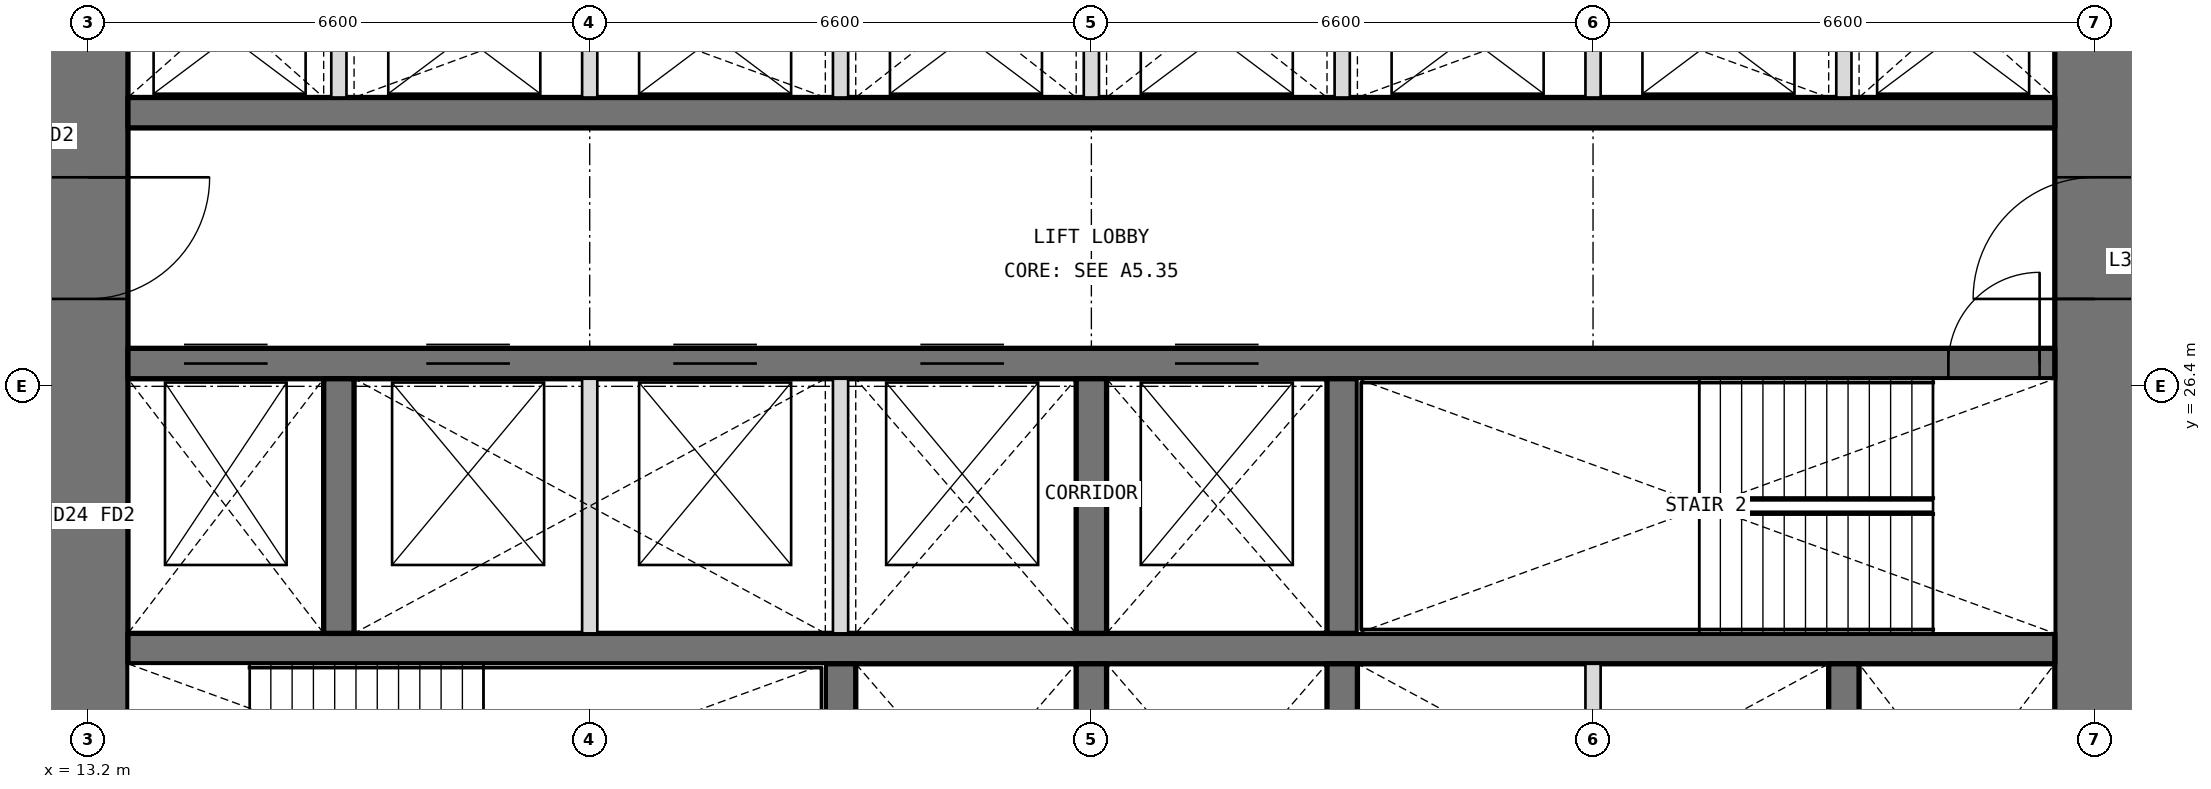
"""IFC4 building model, lengths in metres.
Left out: names, types, materials, properties, quantities, classifications, styles, units other than length and angle.
Written with IfcOpenShell. Run it as: python <this file> out.ifc"""

import sys

from ifc_helpers import new_model, si_unit, direction, frame, frame_2d, origin, place, context, subcontext, project, spatial, rectangle, extrude, element, fill, save


model = new_model("IFC4")
c1 = context("Model", 3, precision=1e-05, world=origin(), true_north=direction((0.0, 1.0)))
c2 = subcontext(c1, "Body", "Model", "MODEL_VIEW")
j1 = project(units=[si_unit("LENGTHUNIT", "METRE"), si_unit("PLANEANGLEUNIT", "RADIAN")], contexts=[c1])
p1 = place(None, origin())
s1 = spatial("IfcSite", under=j1, at=p1, CompositionType="ELEMENT")
p2 = place(p1, origin())
s2 = spatial("IfcBuilding", under=s1, at=p2, CompositionType="ELEMENT")
p3 = place(p2, frame((0.0, 0.0, 145.2)))
s3 = spatial("IfcBuildingStorey", under=s2, at=p3, CompositionType="ELEMENT", Elevation=145.2)
p4 = place(p3, frame((39.6, 13.725, 0.0), z_axis=(0.0, 0.0, 1.0), x_axis=(0.0, 1.0, 0.0)))
e1 = element("IfcWall", 1, at=p4, inside=s3, PredefinedType="SHEAR", context=c2, shape_type="SweptSolid", body=[
    extrude(rectangle(XDim=18.75, YDim=1.05, at=frame_2d((9.375, 0.0))), origin(), (0.0, 0.0, 1.0), 4.2),
])
p5 = place(p4, frame((3.025, 0.0, 0.0)))
e2 = element("IfcOpeningElement", 2, at=p5, cuts=e1, PredefinedType="OPENING", context=c2, shape_type="SweptSolid", body=[
    extrude(rectangle(XDim=1.6, YDim=2.1, at=frame_2d((0.8, 1.05))), frame((0.0, 0.535, 0.0), z_axis=(0.0, -1.0, 0.0), x_axis=(1.0, 0.0, 0.0)), (0.0, 0.0, 1.0), 1.07),
])
p6 = place(p4, frame((13.825, 0.0, 0.0)))
e3 = element("IfcOpeningElement", 3, at=p6, cuts=e1, PredefinedType="OPENING", context=c2, shape_type="SweptSolid", body=[
    extrude(rectangle(XDim=1.6, YDim=2.1, at=frame_2d((0.8, 1.05))), frame((0.0, 0.535, 0.0), z_axis=(0.0, -1.0, 0.0), x_axis=(1.0, 0.0, 0.0)), (0.0, 0.0, 1.0), 1.07),
])
p7 = place(p3, frame((13.2, 32.475, 0.0), z_axis=(0.0, 0.0, 1.0), x_axis=(0.0, -1.0, 0.0)))
e4 = element("IfcWall", 4, at=p7, inside=s3, PredefinedType="SHEAR", context=c2, shape_type="SweptSolid", body=[
    extrude(rectangle(XDim=18.75, YDim=1.05, at=frame_2d((9.375, 0.0))), origin(), (0.0, 0.0, 1.0), 4.2),
])
p8 = place(p7, frame((14.125, 0.0, 0.0)))
e5 = element("IfcOpeningElement", 5, at=p8, cuts=e4, PredefinedType="OPENING", context=c2, shape_type="SweptSolid", body=[
    extrude(rectangle(XDim=1.6, YDim=2.1, at=frame_2d((0.8, 1.05))), frame((0.0, 0.535, 0.0), z_axis=(0.0, -1.0, 0.0), x_axis=(1.0, 0.0, 0.0)), (0.0, 0.0, 1.0), 1.07),
])
p9 = place(p7, frame((3.325, 0.0, 0.0)))
e6 = element("IfcOpeningElement", 6, at=p9, cuts=e4, PredefinedType="OPENING", context=c2, shape_type="SweptSolid", body=[
    extrude(rectangle(XDim=1.6, YDim=2.1, at=frame_2d((0.8, 1.05))), frame((0.0, 0.535, 0.0), z_axis=(0.0, -1.0, 0.0), x_axis=(1.0, 0.0, 0.0)), (0.0, 0.0, 1.0), 1.07),
])
p10 = place(p3, frame((13.725, 22.95, 0.0), z_axis=(0.0, 0.0, 1.0), x_axis=(1.0, 0.0, 0.0)))
e7 = element("IfcWall", 7, at=p10, inside=s3, PredefinedType="SHEAR", context=c2, shape_type="SweptSolid", body=[
    extrude(rectangle(XDim=25.35, YDim=0.4, at=frame_2d((12.675, 0.0))), origin(), (0.0, 0.0, 1.0), 4.2),
])
p11 = place(p3, frame((13.725, 26.7, 0.0), z_axis=(0.0, 0.0, 1.0), x_axis=(1.0, 0.0, 0.0)))
e8 = element("IfcWall", 8, at=p11, inside=s3, PredefinedType="SHEAR", context=c2, shape_type="SweptSolid", body=[
    extrude(rectangle(XDim=25.35, YDim=0.4, at=frame_2d((12.675, 0.0))), origin(), (0.0, 0.0, 1.0), 4.2),
])
p12 = place(p11, frame((23.95, 0.0, 0.0)))
e9 = element("IfcOpeningElement", 9, at=p12, cuts=e8, PredefinedType="OPENING", context=c2, shape_type="SweptSolid", body=[
    extrude(rectangle(XDim=1.2, YDim=2.1, at=frame_2d((0.6, 1.05))), frame((0.0, 0.21, 0.0), z_axis=(0.0, -1.0, 0.0), x_axis=(1.0, 0.0, 0.0)), (0.0, 0.0, 1.0), 0.42),
])
p13 = place(p11, frame((0.738, 0.0, 0.0)))
e10 = element("IfcOpeningElement", 10, at=p13, cuts=e8, PredefinedType="OPENING", context=c2, shape_type="SweptSolid", body=[
    extrude(rectangle(XDim=1.1, YDim=2.1, at=frame_2d((0.55, 1.05))), frame((0.0, 0.21, 0.0), z_axis=(0.0, -1.0, 0.0), x_axis=(1.0, 0.0, 0.0)), (0.0, 0.0, 1.0), 0.42),
])
p14 = place(p11, frame((3.925, 0.0, 0.0)))
e11 = element("IfcOpeningElement", 11, at=p14, cuts=e8, PredefinedType="OPENING", context=c2, shape_type="SweptSolid", body=[
    extrude(rectangle(XDim=1.1, YDim=2.1, at=frame_2d((0.55, 1.05))), frame((0.0, 0.21, 0.0), z_axis=(0.0, -1.0, 0.0), x_axis=(1.0, 0.0, 0.0)), (0.0, 0.0, 1.0), 0.42),
])
p15 = place(p11, frame((7.175, 0.0, 0.0)))
e12 = element("IfcOpeningElement", 12, at=p15, cuts=e8, PredefinedType="OPENING", context=c2, shape_type="SweptSolid", body=[
    extrude(rectangle(XDim=1.1, YDim=2.1, at=frame_2d((0.55, 1.05))), frame((0.0, 0.21, 0.0), z_axis=(0.0, -1.0, 0.0), x_axis=(1.0, 0.0, 0.0)), (0.0, 0.0, 1.0), 0.42),
])
p16 = place(p11, frame((10.425, 0.0, 0.0)))
e13 = element("IfcOpeningElement", 13, at=p16, cuts=e8, PredefinedType="OPENING", context=c2, shape_type="SweptSolid", body=[
    extrude(rectangle(XDim=1.1, YDim=2.1, at=frame_2d((0.55, 1.05))), frame((0.0, 0.21, 0.0), z_axis=(0.0, -1.0, 0.0), x_axis=(1.0, 0.0, 0.0)), (0.0, 0.0, 1.0), 0.42),
])
p17 = place(p11, frame((13.775, 0.0, 0.0)))
e14 = element("IfcOpeningElement", 14, at=p17, cuts=e8, PredefinedType="OPENING", context=c2, shape_type="SweptSolid", body=[
    extrude(rectangle(XDim=1.1, YDim=2.1, at=frame_2d((0.55, 1.05))), frame((0.0, 0.21, 0.0), z_axis=(0.0, -1.0, 0.0), x_axis=(1.0, 0.0, 0.0)), (0.0, 0.0, 1.0), 0.42),
])
p18 = place(p3, frame((13.725, 30.0, 0.0), z_axis=(0.0, 0.0, 1.0), x_axis=(1.0, 0.0, 0.0)))
e15 = element("IfcWall", 15, at=p18, inside=s3, PredefinedType="SHEAR", context=c2, shape_type="SweptSolid", body=[
    extrude(rectangle(XDim=25.35, YDim=0.4, at=frame_2d((12.675, 0.0))), origin(), (0.0, 0.0, 1.0), 4.2),
])
for number, where, z_axis, x_axis in (
    (16, (23.1, 19.4, 0.0), (0.0, 0.0, 1.0), (0.0, 1.0, 0.0)),
    (17, (26.4, 19.4, 0.0), (0.0, 0.0, 1.0), (0.0, 1.0, 0.0)),
    (18, (29.7, 19.4, 0.0), (0.0, 0.0, 1.0), (0.0, 1.0, 0.0)),
    (19, (36.3, 19.4, 0.0), (0.0, 0.0, 1.0), (0.0, 1.0, 0.0)),
    (20, (16.5, 23.15, 0.0), (0.0, 0.0, 1.0), (0.0, 1.0, 0.0)),
    (21, (26.4, 23.15, 0.0), (0.0, 0.0, 1.0), (0.0, 1.0, 0.0)),
    (22, (29.7, 23.15, 0.0), (0.0, 0.0, 1.0), (0.0, 1.0, 0.0)),
):
    element("IfcWall", number, at=place(p3, frame(where, z_axis=z_axis, x_axis=x_axis)), inside=s3, PredefinedType="SHEAR", context=c2, shape_type="SweptSolid", body=[
        extrude(rectangle(XDim=3.35, YDim=0.4, at=frame_2d((1.675, 0.0))), origin(), (0.0, 0.0, 1.0), 4.2),
    ])
for number, where, z_axis, x_axis in (
    (23, (16.5, 30.2, 0.0), (0.0, 0.0, 1.0), (0.0, 1.0, 0.0)),
    (24, (19.8, 30.2, 0.0), (0.0, 0.0, 1.0), (0.0, 1.0, 0.0)),
    (25, (23.1, 30.2, 0.0), (0.0, 0.0, 1.0), (0.0, 1.0, 0.0)),
    (26, (26.4, 30.2, 0.0), (0.0, 0.0, 1.0), (0.0, 1.0, 0.0)),
    (27, (29.7, 30.2, 0.0), (0.0, 0.0, 1.0), (0.0, 1.0, 0.0)),
    (28, (33.0, 30.2, 0.0), (0.0, 0.0, 1.0), (0.0, 1.0, 0.0)),
    (29, (36.3, 30.2, 0.0), (0.0, 0.0, 1.0), (0.0, 1.0, 0.0)),
):
    element("IfcWall", number, at=place(p3, frame(where, z_axis=z_axis, x_axis=x_axis)), inside=s3, PredefinedType="PARTITIONING", context=c2, shape_type="SweptSolid", body=[
        extrude(rectangle(XDim=2.275, YDim=0.2, at=frame_2d((1.138, 0.0))), origin(), (0.0, 0.0, 1.0), 4.2),
    ])
for number, where, z_axis, x_axis in (
    (30, (33.0, 19.4, 0.0), (0.0, 0.0, 1.0), (0.0, 1.0, 0.0)),
    (31, (19.8, 23.15, 0.0), (0.0, 0.0, 1.0), (0.0, 1.0, 0.0)),
    (32, (23.1, 23.15, 0.0), (0.0, 0.0, 1.0), (0.0, 1.0, 0.0)),
):
    element("IfcWall", number, at=place(p3, frame(where, z_axis=z_axis, x_axis=x_axis)), inside=s3, PredefinedType="PARTITIONING", context=c2, shape_type="SweptSolid", body=[
        extrude(rectangle(XDim=3.35, YDim=0.2, at=frame_2d((1.675, 0.0))), origin(), (0.0, 0.0, 1.0), 4.2),
    ])
p19 = place(p12, origin())
e33 = element("IfcDoor", 33, at=p19, inside=s3, OperationType="SINGLE_SWING_RIGHT", PredefinedType="DOOR", context=c2, shape_type="SweptSolid", body=[
    extrude(rectangle(XDim=1.2, YDim=2.1, at=frame_2d((0.6, 1.05))), frame((0.0, 0.025, 0.0), z_axis=(0.0, -1.0, 0.0), x_axis=(1.0, 0.0, 0.0)), (0.0, 0.0, 1.0), 0.05),
])
fill(e9, e33)
p20 = place(p9, origin())
e34 = element("IfcDoor", 34, at=p20, inside=s3, OperationType="DOUBLE_DOOR_DOUBLE_SWING", PredefinedType="DOOR", context=c2, shape_type="SweptSolid", body=[
    extrude(rectangle(XDim=1.6, YDim=2.1, at=frame_2d((0.8, 1.05))), frame((0.0, 0.025, 0.0), z_axis=(0.0, -1.0, 0.0), x_axis=(1.0, 0.0, 0.0)), (0.0, 0.0, 1.0), 0.05),
])
fill(e6, e34)
p21 = place(p6, origin())
e35 = element("IfcDoor", 35, at=p21, inside=s3, OperationType="DOUBLE_DOOR_DOUBLE_SWING", PredefinedType="DOOR", context=c2, shape_type="SweptSolid", body=[
    extrude(rectangle(XDim=1.6, YDim=2.1, at=frame_2d((0.8, 1.05))), frame((0.0, 0.025, 0.0), z_axis=(0.0, -1.0, 0.0), x_axis=(1.0, 0.0, 0.0)), (0.0, 0.0, 1.0), 0.05),
])
fill(e3, e35)
p22 = place(p13, origin())
e36 = element("IfcDoor", 36, at=p22, inside=s3, OperationType="DOUBLE_DOOR_SLIDING", PredefinedType="DOOR", context=c2, shape_type="SweptSolid", body=[
    extrude(rectangle(XDim=1.1, YDim=2.1, at=frame_2d((0.55, 1.05))), frame((0.0, 0.025, 0.0), z_axis=(0.0, -1.0, 0.0), x_axis=(1.0, 0.0, 0.0)), (0.0, 0.0, 1.0), 0.05),
])
fill(e10, e36)
p23 = place(p14, origin())
e37 = element("IfcDoor", 37, at=p23, inside=s3, OperationType="DOUBLE_DOOR_SLIDING", PredefinedType="DOOR", context=c2, shape_type="SweptSolid", body=[
    extrude(rectangle(XDim=1.1, YDim=2.1, at=frame_2d((0.55, 1.05))), frame((0.0, 0.025, 0.0), z_axis=(0.0, -1.0, 0.0), x_axis=(1.0, 0.0, 0.0)), (0.0, 0.0, 1.0), 0.05),
])
fill(e11, e37)
p24 = place(p15, origin())
e38 = element("IfcDoor", 38, at=p24, inside=s3, OperationType="DOUBLE_DOOR_SLIDING", PredefinedType="DOOR", context=c2, shape_type="SweptSolid", body=[
    extrude(rectangle(XDim=1.1, YDim=2.1, at=frame_2d((0.55, 1.05))), frame((0.0, 0.025, 0.0), z_axis=(0.0, -1.0, 0.0), x_axis=(1.0, 0.0, 0.0)), (0.0, 0.0, 1.0), 0.05),
])
fill(e12, e38)
p25 = place(p16, origin())
e39 = element("IfcDoor", 39, at=p25, inside=s3, OperationType="DOUBLE_DOOR_SLIDING", PredefinedType="DOOR", context=c2, shape_type="SweptSolid", body=[
    extrude(rectangle(XDim=1.1, YDim=2.1, at=frame_2d((0.55, 1.05))), frame((0.0, 0.025, 0.0), z_axis=(0.0, -1.0, 0.0), x_axis=(1.0, 0.0, 0.0)), (0.0, 0.0, 1.0), 0.05),
])
fill(e13, e39)
p26 = place(p17, origin())
e40 = element("IfcDoor", 40, at=p26, inside=s3, OperationType="DOUBLE_DOOR_SLIDING", PredefinedType="DOOR", context=c2, shape_type="SweptSolid", body=[
    extrude(rectangle(XDim=1.1, YDim=2.1, at=frame_2d((0.55, 1.05))), frame((0.0, 0.025, 0.0), z_axis=(0.0, -1.0, 0.0), x_axis=(1.0, 0.0, 0.0)), (0.0, 0.0, 1.0), 0.05),
])
fill(e14, e40)
save(model, sys.argv[1])
